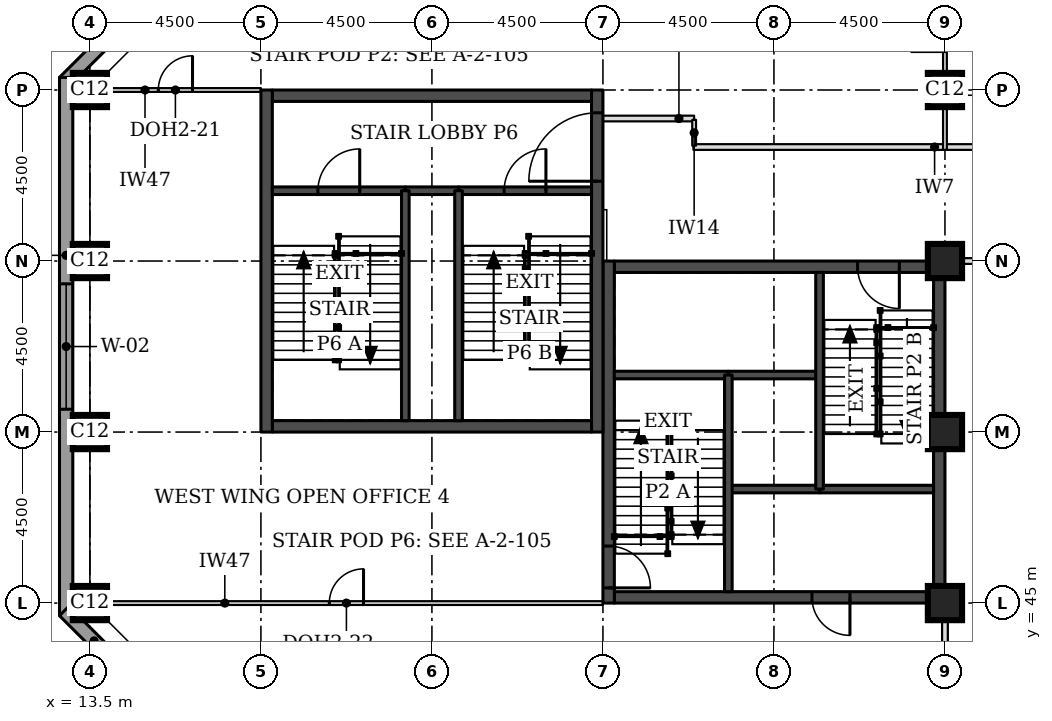
"""IFC4 building model, lengths in metres.
Left out: names, types, materials, properties, quantities, classifications, styles, units other than length and angle.
Written with IfcOpenShell. Run it as: python <this file> out.ifc"""

import sys

from ifc_helpers import new_model, si_unit, direction, frame, frame_2d, origin, origin_2d, place, context, subcontext, project, spatial, rectangle, extrude, element, fill, save


model = new_model("IFC4")
c1 = context("Model", 3, precision=1e-05, world=origin(), true_north=direction((0.0, 1.0)))
c2 = subcontext(c1, "Body", "Model", "MODEL_VIEW")
j1 = project(units=[si_unit("LENGTHUNIT", "METRE"), si_unit("PLANEANGLEUNIT", "RADIAN")], contexts=[c1])
p1 = place(None, origin())
s1 = spatial("IfcSite", under=j1, at=p1, CompositionType="ELEMENT")
p2 = place(p1, origin())
s2 = spatial("IfcBuilding", under=s1, at=p2, CompositionType="ELEMENT")
p3 = place(p2, frame((0.0, 0.0, 158.8)))
s3 = spatial("IfcBuildingStorey", under=s2, at=p3, CompositionType="ELEMENT", Elevation=158.8)
for number, where, z_axis, x_axis in (
    (1, (13.5, 45.0, 0.0), (0.0, 0.0, 1.0), (1.0, 0.0, 0.0)),
    (2, (36.0, 45.0, 0.0), (0.0, 0.0, 1.0), (1.0, 0.0, 0.0)),
    (3, (13.5, 49.5, 0.0), (0.0, 0.0, 1.0), (1.0, 0.0, 0.0)),
    (4, (36.0, 49.5, 0.0), (0.0, 0.0, 1.0), (1.0, 0.0, 0.0)),
    (5, (13.5, 54.0, 0.0), (0.0, 0.0, 1.0), (1.0, 0.0, 0.0)),
    (6, (36.0, 54.0, 0.0), (0.0, 0.0, 1.0), (1.0, 0.0, 0.0)),
    (7, (13.5, 58.5, 0.0), (0.0, 0.0, 1.0), (1.0, 0.0, 0.0)),
    (8, (36.0, 58.5, 0.0), (0.0, 0.0, 1.0), (1.0, 0.0, 0.0)),
):
    element("IfcColumn", number, at=place(p3, frame(where, z_axis=z_axis, x_axis=x_axis)), inside=s3, PredefinedType="COLUMN", context=c2, shape_type="SweptSolid", body=[
        extrude(rectangle(XDim=0.9, YDim=0.9, at=origin_2d()), origin(), (0.0, 0.0, 1.0), 3.7),
    ])
p4 = place(p3, frame((27.3, 45.15, 0.0), z_axis=(0.0, 0.0, 1.0), x_axis=(1.0, 0.0, 0.0)))
e9 = element("IfcWall", 9, at=p4, inside=s3, PredefinedType="SHEAR", context=c2, shape_type="SweptSolid", body=[
    extrude(rectangle(XDim=8.4, YDim=0.3, at=frame_2d((4.2, 0.0))), origin(), (0.0, 0.0, 1.0), 3.7),
])
p5 = place(p4, frame((5.2, 0.0, 0.0)))
e10 = element("IfcOpeningElement", 10, at=p5, cuts=e9, PredefinedType="OPENING", context=c2, shape_type="SweptSolid", body=[
    extrude(rectangle(XDim=1.0, YDim=2.1, at=frame_2d((0.5, 1.05))), frame((0.0, 0.16, 0.0), z_axis=(0.0, -1.0, 0.0), x_axis=(1.0, 0.0, 0.0)), (0.0, 0.0, 1.0), 0.32),
])
p6 = place(p3, frame((27.3, 53.85, 0.0), z_axis=(0.0, 0.0, 1.0), x_axis=(1.0, 0.0, 0.0)))
e11 = element("IfcWall", 11, at=p6, inside=s3, PredefinedType="SHEAR", context=c2, shape_type="SweptSolid", body=[
    extrude(rectangle(XDim=8.4, YDim=0.3, at=frame_2d((4.2, 0.0))), origin(), (0.0, 0.0, 1.0), 3.7),
])
p7 = place(p6, frame((6.4, 0.0, 0.0)))
e12 = element("IfcOpeningElement", 12, at=p7, cuts=e11, PredefinedType="OPENING", context=c2, shape_type="SweptSolid", body=[
    extrude(rectangle(XDim=1.1, YDim=2.1, at=frame_2d((0.55, 1.05))), frame((0.0, 0.16, 0.0), z_axis=(0.0, -1.0, 0.0), x_axis=(1.0, 0.0, 0.0)), (0.0, 0.0, 1.0), 0.32),
])
p8 = place(p3, frame((27.15, 45.0, 0.0), z_axis=(0.0, 0.0, 1.0), x_axis=(0.0, 1.0, 0.0)))
e13 = element("IfcWall", 13, at=p8, inside=s3, PredefinedType="SHEAR", context=c2, shape_type="SweptSolid", body=[
    extrude(rectangle(XDim=9.0, YDim=0.3, at=frame_2d((4.5, 0.0))), origin(), (0.0, 0.0, 1.0), 3.7),
])
p9 = place(p8, frame((0.4, 0.0, 0.0)))
e14 = element("IfcOpeningElement", 14, at=p9, cuts=e13, PredefinedType="OPENING", context=c2, shape_type="SweptSolid", body=[
    extrude(rectangle(XDim=1.1, YDim=2.1, at=frame_2d((0.55, 1.05))), frame((0.0, 0.16, 0.0), z_axis=(0.0, -1.0, 0.0), x_axis=(1.0, 0.0, 0.0)), (0.0, 0.0, 1.0), 0.32),
])
p10 = place(p3, frame((35.85, 45.0, 0.0), z_axis=(0.0, 0.0, 1.0), x_axis=(0.0, 1.0, 0.0)))
e15 = element("IfcWall", 15, at=p10, inside=s3, PredefinedType="SHEAR", context=c2, shape_type="SweptSolid", body=[
    extrude(rectangle(XDim=9.0, YDim=0.3, at=frame_2d((4.5, 0.0))), origin(), (0.0, 0.0, 1.0), 3.7),
])
for number, where, z_axis, x_axis in (
    (16, (18.3, 49.65, 0.0), (0.0, 0.0, 1.0), (1.0, 0.0, 0.0)),
    (17, (18.3, 58.35, 0.0), (0.0, 0.0, 1.0), (1.0, 0.0, 0.0)),
):
    element("IfcWall", number, at=place(p3, frame(where, z_axis=z_axis, x_axis=x_axis)), inside=s3, PredefinedType="SHEAR", context=c2, shape_type="SweptSolid", body=[
        extrude(rectangle(XDim=8.4, YDim=0.3, at=frame_2d((4.2, 0.0))), origin(), (0.0, 0.0, 1.0), 3.7),
    ])
p11 = place(p3, frame((18.15, 49.5, 0.0), z_axis=(0.0, 0.0, 1.0), x_axis=(0.0, 1.0, 0.0)))
e18 = element("IfcWall", 18, at=p11, inside=s3, PredefinedType="SHEAR", context=c2, shape_type="SweptSolid", body=[
    extrude(rectangle(XDim=9.0, YDim=0.3, at=frame_2d((4.5, 0.0))), origin(), (0.0, 0.0, 1.0), 3.7),
])
p12 = place(p3, frame((26.85, 49.5, 0.0), z_axis=(0.0, 0.0, 1.0), x_axis=(0.0, 1.0, 0.0)))
e19 = element("IfcWall", 19, at=p12, inside=s3, PredefinedType="SHEAR", context=c2, shape_type="SweptSolid", body=[
    extrude(rectangle(XDim=9.0, YDim=0.3, at=frame_2d((4.5, 0.0))), origin(), (0.0, 0.0, 1.0), 3.7),
])
p13 = place(p12, frame((6.6, 0.0, 0.0)))
e20 = element("IfcOpeningElement", 20, at=p13, cuts=e19, PredefinedType="OPENING", context=c2, shape_type="SweptSolid", body=[
    extrude(rectangle(XDim=1.8, YDim=2.1, at=frame_2d((0.9, 1.05))), frame((0.0, 0.16, 0.0), z_axis=(0.0, -1.0, 0.0), x_axis=(1.0, 0.0, 0.0)), (0.0, 0.0, 1.0), 0.32),
])
p14 = place(p3, frame((17.792, 63.676, 0.0), z_axis=(0.0, 0.0, 1.0), x_axis=(-0.707106781187, -0.707106781187, 0.0)))
e21 = element("IfcWall", 21, at=p14, inside=s3, PredefinedType="STANDARD", context=c2, shape_type="SweptSolid", body=[
    extrude(rectangle(XDim=7.027, YDim=0.35, at=frame_2d((3.513, 0.0))), origin(), (0.0, 0.0, 1.0), 3.525),
])
p15 = place(p14, frame((1.863, 0.0, 0.9)))
e22 = element("IfcOpeningElement", 22, at=p15, cuts=e21, PredefinedType="OPENING", context=c2, shape_type="SweptSolid", body=[
    extrude(rectangle(XDim=3.3, YDim=1.9, at=frame_2d((1.65, 0.95))), frame((0.0, 0.185, 0.0), z_axis=(0.0, -1.0, 0.0), x_axis=(1.0, 0.0, 0.0)), (0.0, 0.0, 1.0), 0.37),
])
p16 = place(p3, frame((12.875, 58.831, 0.0), z_axis=(0.0, 0.0, 1.0), x_axis=(0.0, -1.0, 0.0)))
e23 = element("IfcWall", 23, at=p16, inside=s3, PredefinedType="STANDARD", context=c2, shape_type="SweptSolid", body=[
    extrude(rectangle(XDim=14.163, YDim=0.35, at=frame_2d((7.081, 0.0))), origin(), (0.0, 0.0, 1.0), 3.525),
])
p17 = place(p16, frame((5.431, 0.0, 0.9)))
e24 = element("IfcOpeningElement", 24, at=p17, cuts=e23, PredefinedType="OPENING", context=c2, shape_type="SweptSolid", body=[
    extrude(rectangle(XDim=3.3, YDim=1.9, at=frame_2d((1.65, 0.95))), frame((0.0, 0.185, 0.0), z_axis=(0.0, -1.0, 0.0), x_axis=(1.0, 0.0, 0.0)), (0.0, 0.0, 1.0), 0.37),
])
p18 = place(p3, frame((12.824, 44.792, 0.0), z_axis=(0.0, 0.0, 1.0), x_axis=(0.707106781187, -0.707106781187, 0.0)))
e25 = element("IfcWall", 25, at=p18, inside=s3, PredefinedType="STANDARD", context=c2, shape_type="SweptSolid", body=[
    extrude(rectangle(XDim=7.027, YDim=0.35, at=frame_2d((3.513, 0.0))), origin(), (0.0, 0.0, 1.0), 3.525),
])
p19 = place(p18, frame((1.863, 0.0, 0.9)))
e26 = element("IfcOpeningElement", 26, at=p19, cuts=e25, PredefinedType="OPENING", context=c2, shape_type="SweptSolid", body=[
    extrude(rectangle(XDim=3.3, YDim=1.9, at=frame_2d((1.65, 0.95))), frame((0.0, 0.185, 0.0), z_axis=(0.0, -1.0, 0.0), x_axis=(1.0, 0.0, 0.0)), (0.0, 0.0, 1.0), 0.37),
])
p20 = place(p3, frame((36.45, 54.0, 0.0), z_axis=(0.0, 0.0, 1.0), x_axis=(1.0, 0.0, 0.0)))
e27 = element("IfcWall", 27, at=p20, inside=s3, PredefinedType="PARTITIONING", context=c2, shape_type="SweptSolid", body=[
    extrude(rectangle(XDim=5.625, YDim=0.15, at=frame_2d((2.812, 0.0))), origin(), (0.0, 0.0, 1.0), 3.55),
])
p21 = place(p3, frame((29.38, 57.0, 0.0), z_axis=(0.0, 0.0, 1.0), x_axis=(1.0, 0.0, 0.0)))
e28 = element("IfcWall", 28, at=p21, inside=s3, PredefinedType="PARTITIONING", context=c2, shape_type="SweptSolid", body=[
    extrude(rectangle(XDim=12.695, YDim=0.15, at=frame_2d((6.348, 0.0))), origin(), (0.0, 0.0, 1.0), 3.55),
])
p22 = place(p3, frame((36.0, 40.95, 0.0), z_axis=(0.0, 0.0, 1.0), x_axis=(0.0, 1.0, 0.0)))
e29 = element("IfcWall", 29, at=p22, inside=s3, PredefinedType="PARTITIONING", context=c2, shape_type="SweptSolid", body=[
    extrude(rectangle(XDim=3.63, YDim=0.15, at=frame_2d((1.815, 0.0))), origin(), (0.0, 0.0, 1.0), 2.8),
])
p23 = place(p22, frame((1.4, 0.0, 0.0)))
e30 = element("IfcOpeningElement", 30, at=p23, cuts=e29, PredefinedType="OPENING", context=c2, shape_type="SweptSolid", body=[
    extrude(rectangle(XDim=0.9, YDim=2.1, at=frame_2d((0.45, 1.05))), frame((0.0, 0.085, 0.0), z_axis=(0.0, -1.0, 0.0), x_axis=(1.0, 0.0, 0.0)), (0.0, 0.0, 1.0), 0.17),
])
p24 = place(p3, frame((36.0, 63.0, 0.0), z_axis=(0.0, 0.0, 1.0), x_axis=(0.0, -1.0, 0.0)))
e31 = element("IfcWall", 31, at=p24, inside=s3, PredefinedType="PARTITIONING", context=c2, shape_type="SweptSolid", body=[
    extrude(rectangle(XDim=6.075, YDim=0.1, at=frame_2d((3.038, 0.0))), origin(), (0.0, 0.0, 1.0), 2.8),
])
p25 = place(p24, frame((2.588, 0.0, 0.0)))
e32 = element("IfcOpeningElement", 32, at=p25, cuts=e31, PredefinedType="OPENING", context=c2, shape_type="SweptSolid", body=[
    extrude(rectangle(XDim=0.9, YDim=2.1, at=frame_2d((0.45, 1.05))), frame((0.0, 0.06, 0.0), z_axis=(0.0, -1.0, 0.0), x_axis=(1.0, 0.0, 0.0)), (0.0, 0.0, 1.0), 0.12),
])
p26 = place(p3, frame((13.5, 58.5, 0.0), z_axis=(0.0, 0.0, 1.0), x_axis=(1.0, 0.0, 0.0)))
e33 = element("IfcWall", 33, at=p26, inside=s3, PredefinedType="PARTITIONING", context=c2, shape_type="SweptSolid", body=[
    extrude(rectangle(XDim=4.5, YDim=0.1, at=frame_2d((2.25, 0.0))), origin(), (0.0, 0.0, 1.0), 2.55),
])
p27 = place(p26, frame((1.8, 0.0, 0.0)))
e34 = element("IfcOpeningElement", 34, at=p27, cuts=e33, PredefinedType="OPENING", context=c2, shape_type="SweptSolid", body=[
    extrude(rectangle(XDim=0.9, YDim=2.1, at=frame_2d((0.45, 1.05))), frame((0.0, 0.06, 0.0), z_axis=(0.0, -1.0, 0.0), x_axis=(1.0, 0.0, 0.0)), (0.0, 0.0, 1.0), 0.12),
])
p28 = place(p3, frame((13.5, 45.0, 0.0), z_axis=(0.0, 0.0, 1.0), x_axis=(1.0, 0.0, 0.0)))
e35 = element("IfcWall", 35, at=p28, inside=s3, PredefinedType="PARTITIONING", context=c2, shape_type="SweptSolid", body=[
    extrude(rectangle(XDim=13.5, YDim=0.1, at=frame_2d((6.75, 0.0))), origin(), (0.0, 0.0, 1.0), 2.55),
])
p29 = place(p28, frame((6.3, 0.0, 0.0)))
e36 = element("IfcOpeningElement", 36, at=p29, cuts=e35, PredefinedType="OPENING", context=c2, shape_type="SweptSolid", body=[
    extrude(rectangle(XDim=0.9, YDim=2.1, at=frame_2d((0.45, 1.05))), frame((0.0, 0.06, 0.0), z_axis=(0.0, -1.0, 0.0), x_axis=(1.0, 0.0, 0.0)), (0.0, 0.0, 1.0), 0.12),
])
p30 = place(p3, frame((27.0, 57.75, 0.0), z_axis=(0.0, 0.0, 1.0), x_axis=(1.0, 0.0, 0.0)))
e37 = element("IfcWall", 37, at=p30, inside=s3, PredefinedType="PARTITIONING", context=c2, shape_type="SweptSolid", body=[
    extrude(rectangle(XDim=2.4, YDim=0.15, at=frame_2d((1.2, 0.0))), origin(), (0.0, 0.0, 1.0), 3.55),
])
p31 = place(p3, frame((29.4, 57.715, 0.0), z_axis=(0.0, 0.0, 1.0), x_axis=(0.0, -1.0, 0.0)))
e38 = element("IfcWall", 38, at=p31, inside=s3, PredefinedType="PARTITIONING", context=c2, shape_type="SweptSolid", body=[
    extrude(rectangle(XDim=0.68, YDim=0.1, at=frame_2d((0.34, 0.0))), origin(), (0.0, 0.0, 1.0), 3.55),
])
p32 = place(p3, frame((30.3, 48.0, 0.0), z_axis=(0.0, 0.0, 1.0), x_axis=(1.0, 0.0, 0.0)))
e39 = element("IfcWall", 39, at=p32, inside=s3, PredefinedType="SOLIDWALL", context=c2, shape_type="SweptSolid", body=[
    extrude(rectangle(XDim=2.4, YDim=0.2, at=frame_2d((1.2, 0.0))), origin(), (0.0, 0.0, 1.0), 3.55),
])
p33 = place(p3, frame((32.7, 48.0, 0.0), z_axis=(0.0, 0.0, 1.0), x_axis=(1.0, 0.0, 0.0)))
e40 = element("IfcWall", 40, at=p33, inside=s3, PredefinedType="SOLIDWALL", context=c2, shape_type="SweptSolid", body=[
    extrude(rectangle(XDim=3.0, YDim=0.2, at=frame_2d((1.5, 0.0))), origin(), (0.0, 0.0, 1.0), 3.55),
])
p34 = place(p3, frame((30.3, 51.0, 0.0), z_axis=(0.0, 0.0, 1.0), x_axis=(1.0, 0.0, 0.0)))
e41 = element("IfcWall", 41, at=p34, inside=s3, PredefinedType="SOLIDWALL", context=c2, shape_type="SweptSolid", body=[
    extrude(rectangle(XDim=2.4, YDim=0.2, at=frame_2d((1.2, 0.0))), origin(), (0.0, 0.0, 1.0), 3.7),
])
p35 = place(p3, frame((27.3, 51.0, 0.0), z_axis=(0.0, 0.0, 1.0), x_axis=(1.0, 0.0, 0.0)))
e42 = element("IfcWall", 42, at=p35, inside=s3, PredefinedType="SOLIDWALL", context=c2, shape_type="SweptSolid", body=[
    extrude(rectangle(XDim=3.0, YDim=0.2, at=frame_2d((1.5, 0.0))), origin(), (0.0, 0.0, 1.0), 3.55),
])
for number, where, z_axis, x_axis in (
    (43, (30.3, 45.3, 0.0), (0.0, 0.0, 1.0), (0.0, 1.0, 0.0)),
    (44, (32.7, 48.0, 0.0), (0.0, 0.0, 1.0), (0.0, 1.0, 0.0)),
):
    element("IfcWall", number, at=place(p3, frame(where, z_axis=z_axis, x_axis=x_axis)), inside=s3, PredefinedType="SOLIDWALL", context=c2, shape_type="SweptSolid", body=[
        extrude(rectangle(XDim=5.7, YDim=0.2, at=frame_2d((2.85, 0.0))), origin(), (0.0, 0.0, 1.0), 3.55),
    ])
p36 = place(p3, frame((21.8, 55.85, 0.0), z_axis=(0.0, 0.0, 1.0), x_axis=(1.0, 0.0, 0.0)))
e45 = element("IfcWall", 45, at=p36, inside=s3, PredefinedType="SOLIDWALL", context=c2, shape_type="SweptSolid", body=[
    extrude(rectangle(XDim=1.4, YDim=0.2, at=frame_2d((0.7, 0.0))), origin(), (0.0, 0.0, 1.0), 3.55),
])
p37 = place(p3, frame((18.3, 55.85, 0.0), z_axis=(0.0, 0.0, 1.0), x_axis=(1.0, 0.0, 0.0)))
e46 = element("IfcWall", 46, at=p37, inside=s3, PredefinedType="SOLIDWALL", context=c2, shape_type="SweptSolid", body=[
    extrude(rectangle(XDim=3.5, YDim=0.2, at=frame_2d((1.75, 0.0))), origin(), (0.0, 0.0, 1.0), 3.55),
])
p38 = place(p37, frame((1.2, 0.0, 0.0)))
e47 = element("IfcOpeningElement", 47, at=p38, cuts=e46, PredefinedType="OPENING", context=c2, shape_type="SweptSolid", body=[
    extrude(rectangle(XDim=1.1, YDim=2.1, at=frame_2d((0.55, 1.05))), frame((0.0, 0.11, 0.0), z_axis=(0.0, -1.0, 0.0), x_axis=(1.0, 0.0, 0.0)), (0.0, 0.0, 1.0), 0.22),
])
p39 = place(p3, frame((23.2, 55.85, 0.0), z_axis=(0.0, 0.0, 1.0), x_axis=(1.0, 0.0, 0.0)))
e48 = element("IfcWall", 48, at=p39, inside=s3, PredefinedType="SOLIDWALL", context=c2, shape_type="SweptSolid", body=[
    extrude(rectangle(XDim=3.5, YDim=0.2, at=frame_2d((1.75, 0.0))), origin(), (0.0, 0.0, 1.0), 3.55),
])
p40 = place(p39, frame((1.2, 0.0, 0.0)))
e49 = element("IfcOpeningElement", 49, at=p40, cuts=e48, PredefinedType="OPENING", context=c2, shape_type="SweptSolid", body=[
    extrude(rectangle(XDim=1.1, YDim=2.1, at=frame_2d((0.55, 1.05))), frame((0.0, 0.11, 0.0), z_axis=(0.0, -1.0, 0.0), x_axis=(1.0, 0.0, 0.0)), (0.0, 0.0, 1.0), 0.22),
])
for number, where, z_axis, x_axis in (
    (50, (21.8, 49.8, 0.0), (0.0, 0.0, 1.0), (0.0, 1.0, 0.0)),
    (51, (23.2, 49.8, 0.0), (0.0, 0.0, 1.0), (0.0, 1.0, 0.0)),
):
    element("IfcWall", number, at=place(p3, frame(where, z_axis=z_axis, x_axis=x_axis)), inside=s3, PredefinedType="SOLIDWALL", context=c2, shape_type="SweptSolid", body=[
        extrude(rectangle(XDim=6.05, YDim=0.2, at=frame_2d((3.025, 0.0))), origin(), (0.0, 0.0, 1.0), 3.55),
    ])
p41 = place(p17, origin())
e52 = element("IfcWindow", 52, at=p41, inside=s3, PartitioningType="SINGLE_PANEL", PredefinedType="WINDOW", context=c2, shape_type="SweptSolid", body=[
    extrude(rectangle(XDim=3.3, YDim=1.9, at=frame_2d((1.65, 0.95))), frame((0.0, 0.085, 0.0), z_axis=(0.0, -1.0, 0.0), x_axis=(1.0, 0.0, 0.0)), (0.0, 0.0, 1.0), 0.06),
])
fill(e24, e52)
p42 = place(p27, origin())
e53 = element("IfcDoor", 53, at=p42, inside=s3, OperationType="SINGLE_SWING_RIGHT", PredefinedType="DOOR", context=c2, shape_type="SweptSolid", body=[
    extrude(rectangle(XDim=0.9, YDim=2.1, at=frame_2d((0.45, 1.05))), frame((0.0, 0.025, 0.0), z_axis=(0.0, -1.0, 0.0), x_axis=(1.0, 0.0, 0.0)), (0.0, 0.0, 1.0), 0.05),
])
fill(e34, e53)
p43 = place(p29, origin())
e54 = element("IfcDoor", 54, at=p43, inside=s3, OperationType="SINGLE_SWING_RIGHT", PredefinedType="DOOR", context=c2, shape_type="SweptSolid", body=[
    extrude(rectangle(XDim=0.9, YDim=2.1, at=frame_2d((0.45, 1.05))), frame((0.0, 0.025, 0.0), z_axis=(0.0, -1.0, 0.0), x_axis=(1.0, 0.0, 0.0)), (0.0, 0.0, 1.0), 0.05),
])
fill(e36, e54)
p44 = place(p9, frame((1.1, 0.0, 0.0), z_axis=(0.0, 0.0, 1.0), x_axis=(-1.0, 0.0, 0.0)))
e55 = element("IfcDoor", 55, at=p44, inside=s3, OperationType="SINGLE_SWING_RIGHT", PredefinedType="DOOR", context=c2, shape_type="SweptSolid", body=[
    extrude(rectangle(XDim=1.1, YDim=2.1, at=frame_2d((0.55, 1.05))), frame((0.0, 0.025, 0.0), z_axis=(0.0, -1.0, 0.0), x_axis=(1.0, 0.0, 0.0)), (0.0, 0.0, 1.0), 0.05),
])
fill(e14, e55)
p45 = place(p7, frame((1.1, 0.0, 0.0), z_axis=(0.0, 0.0, 1.0), x_axis=(-1.0, 0.0, 0.0)))
e56 = element("IfcDoor", 56, at=p45, inside=s3, OperationType="SINGLE_SWING_LEFT", PredefinedType="DOOR", context=c2, shape_type="SweptSolid", body=[
    extrude(rectangle(XDim=1.1, YDim=2.1, at=frame_2d((0.55, 1.05))), frame((0.0, 0.025, 0.0), z_axis=(0.0, -1.0, 0.0), x_axis=(1.0, 0.0, 0.0)), (0.0, 0.0, 1.0), 0.05),
])
fill(e12, e56)
p46 = place(p5, frame((1.0, 0.0, 0.0), z_axis=(0.0, 0.0, 1.0), x_axis=(-1.0, 0.0, 0.0)))
e57 = element("IfcDoor", 57, at=p46, inside=s3, OperationType="SINGLE_SWING_LEFT", PredefinedType="DOOR", context=c2, shape_type="SweptSolid", body=[
    extrude(rectangle(XDim=1.0, YDim=2.1, at=frame_2d((0.5, 1.05))), frame((0.0, 0.025, 0.0), z_axis=(0.0, -1.0, 0.0), x_axis=(1.0, 0.0, 0.0)), (0.0, 0.0, 1.0), 0.05),
])
fill(e10, e57)
p47 = place(p38, origin())
e58 = element("IfcDoor", 58, at=p47, inside=s3, OperationType="SINGLE_SWING_RIGHT", PredefinedType="DOOR", context=c2, shape_type="SweptSolid", body=[
    extrude(rectangle(XDim=1.1, YDim=2.1, at=frame_2d((0.55, 1.05))), frame((0.0, 0.025, 0.0), z_axis=(0.0, -1.0, 0.0), x_axis=(1.0, 0.0, 0.0)), (0.0, 0.0, 1.0), 0.05),
])
fill(e47, e58)
p48 = place(p40, origin())
e59 = element("IfcDoor", 59, at=p48, inside=s3, OperationType="SINGLE_SWING_RIGHT", PredefinedType="DOOR", context=c2, shape_type="SweptSolid", body=[
    extrude(rectangle(XDim=1.1, YDim=2.1, at=frame_2d((0.55, 1.05))), frame((0.0, 0.025, 0.0), z_axis=(0.0, -1.0, 0.0), x_axis=(1.0, 0.0, 0.0)), (0.0, 0.0, 1.0), 0.05),
])
fill(e49, e59)
p49 = place(p13, origin())
e60 = element("IfcDoor", 60, at=p49, inside=s3, OperationType="SINGLE_SWING_LEFT", PredefinedType="DOOR", context=c2, shape_type="SweptSolid", body=[
    extrude(rectangle(XDim=1.8, YDim=2.1, at=frame_2d((0.9, 1.05))), frame((0.0, 0.025, 0.0), z_axis=(0.0, -1.0, 0.0), x_axis=(1.0, 0.0, 0.0)), (0.0, 0.0, 1.0), 0.05),
])
fill(e20, e60)
save(model, sys.argv[1])
